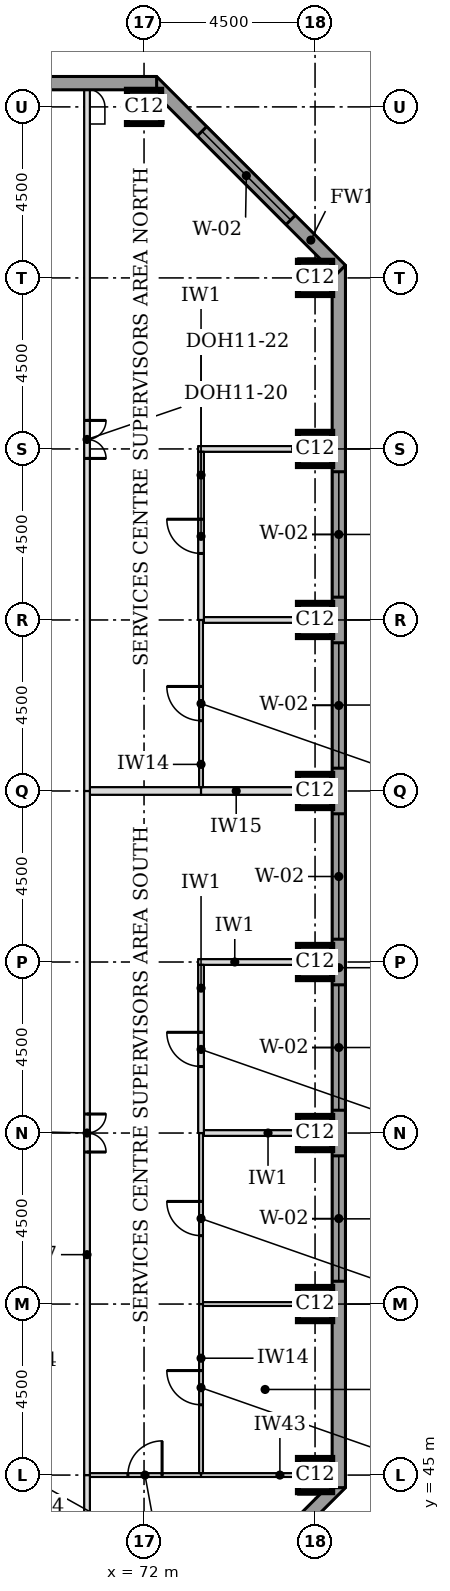
"""IFC4 building model, lengths in metres.
Left out: names, types, materials, properties, quantities, classifications, styles, units other than length and angle.
Written with IfcOpenShell. Run it as: python <this file> out.ifc"""

import sys

from ifc_helpers import new_model, si_unit, direction, frame, frame_2d, origin, origin_2d, place, context, subcontext, project, spatial, rectangle, extrude, element, fill, save


model = new_model("IFC4")
c1 = context("Model", 3, precision=1e-05, world=origin(), true_north=direction((0.0, 1.0)))
c2 = subcontext(c1, "Body", "Model", "MODEL_VIEW")
j1 = project(units=[si_unit("LENGTHUNIT", "METRE"), si_unit("PLANEANGLEUNIT", "RADIAN")], contexts=[c1])
p1 = place(None, origin())
s1 = spatial("IfcSite", under=j1, at=p1, CompositionType="ELEMENT")
p2 = place(p1, origin())
s2 = spatial("IfcBuilding", under=s1, at=p2, CompositionType="ELEMENT")
p3 = place(p2, frame((0.0, 0.0, 237.8)))
s3 = spatial("IfcBuildingStorey", under=s2, at=p3, CompositionType="ELEMENT", Elevation=237.8)
for number, where, z_axis, x_axis in (
    (1, (76.5, 45.0, 0.0), (0.0, 0.0, 1.0), (1.0, 0.0, 0.0)),
    (2, (76.5, 49.5, 0.0), (0.0, 0.0, 1.0), (1.0, 0.0, 0.0)),
    (3, (76.5, 54.0, 0.0), (0.0, 0.0, 1.0), (1.0, 0.0, 0.0)),
    (4, (76.5, 58.5, 0.0), (0.0, 0.0, 1.0), (1.0, 0.0, 0.0)),
    (5, (76.5, 63.0, 0.0), (0.0, 0.0, 1.0), (1.0, 0.0, 0.0)),
    (6, (76.5, 67.5, 0.0), (0.0, 0.0, 1.0), (1.0, 0.0, 0.0)),
    (7, (76.5, 72.0, 0.0), (0.0, 0.0, 1.0), (1.0, 0.0, 0.0)),
    (8, (76.5, 76.5, 0.0), (0.0, 0.0, 1.0), (1.0, 0.0, 0.0)),
    (9, (72.0, 81.0, 0.0), (0.0, 0.0, 1.0), (1.0, 0.0, 0.0)),
):
    element("IfcColumn", number, at=place(p3, frame(where, z_axis=z_axis, x_axis=x_axis)), inside=s3, PredefinedType="COLUMN", context=c2, shape_type="SweptSolid", body=[
        extrude(rectangle(XDim=0.9, YDim=0.9, at=origin_2d()), origin(), (0.0, 0.0, 1.0), 3.7),
    ])
p4 = place(p3, frame((72.208, 39.824, 0.0), z_axis=(0.0, 0.0, 1.0), x_axis=(0.707106781187, 0.707106781187, 0.0)))
e10 = element("IfcWall", 10, at=p4, inside=s3, PredefinedType="STANDARD", context=c2, shape_type="SweptSolid", body=[
    extrude(rectangle(XDim=7.027, YDim=0.35, at=frame_2d((3.513, 0.0))), origin(), (0.0, 0.0, 1.0), 3.525),
])
p5 = place(p4, frame((1.863, 0.0, 0.9)))
e11 = element("IfcOpeningElement", 11, at=p5, cuts=e10, PredefinedType="OPENING", context=c2, shape_type="SweptSolid", body=[
    extrude(rectangle(XDim=3.3, YDim=1.9, at=frame_2d((1.65, 0.95))), frame((0.0, 0.185, 0.0), z_axis=(0.0, -1.0, 0.0), x_axis=(1.0, 0.0, 0.0)), (0.0, 0.0, 1.0), 0.37),
])
p6 = place(p3, frame((77.125, 44.669, 0.0), z_axis=(0.0, 0.0, 1.0), x_axis=(0.0, 1.0, 0.0)))
e12 = element("IfcWall", 12, at=p6, inside=s3, PredefinedType="STANDARD", context=c2, shape_type="SweptSolid", body=[
    extrude(rectangle(XDim=32.163, YDim=0.35, at=frame_2d((16.081, 0.0))), origin(), (0.0, 0.0, 1.0), 3.525),
])
p7 = place(p6, frame((5.431, 0.0, 0.9)))
e13 = element("IfcOpeningElement", 13, at=p7, cuts=e12, PredefinedType="OPENING", context=c2, shape_type="SweptSolid", body=[
    extrude(rectangle(XDim=3.3, YDim=1.9, at=frame_2d((1.65, 0.95))), frame((0.0, 0.185, 0.0), z_axis=(0.0, -1.0, 0.0), x_axis=(1.0, 0.0, 0.0)), (0.0, 0.0, 1.0), 0.37),
])
p8 = place(p6, frame((9.931, 0.0, 0.9)))
e14 = element("IfcOpeningElement", 14, at=p8, cuts=e12, PredefinedType="OPENING", context=c2, shape_type="SweptSolid", body=[
    extrude(rectangle(XDim=3.3, YDim=1.9, at=frame_2d((1.65, 0.95))), frame((0.0, 0.185, 0.0), z_axis=(0.0, -1.0, 0.0), x_axis=(1.0, 0.0, 0.0)), (0.0, 0.0, 1.0), 0.37),
])
p9 = place(p6, frame((14.431, 0.0, 0.9)))
e15 = element("IfcOpeningElement", 15, at=p9, cuts=e12, PredefinedType="OPENING", context=c2, shape_type="SweptSolid", body=[
    extrude(rectangle(XDim=3.3, YDim=1.9, at=frame_2d((1.65, 0.95))), frame((0.0, 0.185, 0.0), z_axis=(0.0, -1.0, 0.0), x_axis=(1.0, 0.0, 0.0)), (0.0, 0.0, 1.0), 0.37),
])
p10 = place(p6, frame((18.931, 0.0, 0.9)))
e16 = element("IfcOpeningElement", 16, at=p10, cuts=e12, PredefinedType="OPENING", context=c2, shape_type="SweptSolid", body=[
    extrude(rectangle(XDim=3.3, YDim=1.9, at=frame_2d((1.65, 0.95))), frame((0.0, 0.185, 0.0), z_axis=(0.0, -1.0, 0.0), x_axis=(1.0, 0.0, 0.0)), (0.0, 0.0, 1.0), 0.37),
])
p11 = place(p6, frame((23.431, 0.0, 0.9)))
e17 = element("IfcOpeningElement", 17, at=p11, cuts=e12, PredefinedType="OPENING", context=c2, shape_type="SweptSolid", body=[
    extrude(rectangle(XDim=3.3, YDim=1.9, at=frame_2d((1.65, 0.95))), frame((0.0, 0.185, 0.0), z_axis=(0.0, -1.0, 0.0), x_axis=(1.0, 0.0, 0.0)), (0.0, 0.0, 1.0), 0.37),
])
p12 = place(p3, frame((77.176, 76.708, 0.0), z_axis=(0.0, 0.0, 1.0), x_axis=(-0.707106781187, 0.707106781187, 0.0)))
e18 = element("IfcWall", 18, at=p12, inside=s3, PredefinedType="STANDARD", context=c2, shape_type="SweptSolid", body=[
    extrude(rectangle(XDim=7.027, YDim=0.35, at=frame_2d((3.513, 0.0))), origin(), (0.0, 0.0, 1.0), 3.525),
])
p13 = place(p12, frame((1.863, 0.0, 0.9)))
e19 = element("IfcOpeningElement", 19, at=p13, cuts=e18, PredefinedType="OPENING", context=c2, shape_type="SweptSolid", body=[
    extrude(rectangle(XDim=3.3, YDim=1.9, at=frame_2d((1.65, 0.95))), frame((0.0, 0.185, 0.0), z_axis=(0.0, -1.0, 0.0), x_axis=(1.0, 0.0, 0.0)), (0.0, 0.0, 1.0), 0.37),
])
p14 = place(p3, frame((72.331, 81.625, 0.0), z_axis=(0.0, 0.0, 1.0), x_axis=(-1.0, 0.0, 0.0)))
e20 = element("IfcWall", 20, at=p14, inside=s3, PredefinedType="STANDARD", context=c2, shape_type="SweptSolid", body=[
    extrude(rectangle(XDim=32.163, YDim=0.35, at=frame_2d((16.081, 0.0))), origin(), (0.0, 0.0, 1.0), 3.525),
])
p15 = place(p14, frame((5.431, 0.0, 0.9)))
e21 = element("IfcOpeningElement", 21, at=p15, cuts=e20, PredefinedType="OPENING", context=c2, shape_type="SweptSolid", body=[
    extrude(rectangle(XDim=3.3, YDim=1.9, at=frame_2d((1.65, 0.95))), frame((0.0, 0.185, 0.0), z_axis=(0.0, -1.0, 0.0), x_axis=(1.0, 0.0, 0.0)), (0.0, 0.0, 1.0), 0.37),
])
p16 = place(p14, frame((9.931, 0.0, 0.9)))
e22 = element("IfcOpeningElement", 22, at=p16, cuts=e20, PredefinedType="OPENING", context=c2, shape_type="SweptSolid", body=[
    extrude(rectangle(XDim=3.3, YDim=1.9, at=frame_2d((1.65, 0.95))), frame((0.0, 0.185, 0.0), z_axis=(0.0, -1.0, 0.0), x_axis=(1.0, 0.0, 0.0)), (0.0, 0.0, 1.0), 0.37),
])
p17 = place(p14, frame((14.431, 0.0, 0.9)))
e23 = element("IfcOpeningElement", 23, at=p17, cuts=e20, PredefinedType="OPENING", context=c2, shape_type="SweptSolid", body=[
    extrude(rectangle(XDim=3.3, YDim=1.9, at=frame_2d((1.65, 0.95))), frame((0.0, 0.185, 0.0), z_axis=(0.0, -1.0, 0.0), x_axis=(1.0, 0.0, 0.0)), (0.0, 0.0, 1.0), 0.37),
])
p18 = place(p14, frame((18.931, 0.0, 0.9)))
e24 = element("IfcOpeningElement", 24, at=p18, cuts=e20, PredefinedType="OPENING", context=c2, shape_type="SweptSolid", body=[
    extrude(rectangle(XDim=3.3, YDim=1.9, at=frame_2d((1.65, 0.95))), frame((0.0, 0.185, 0.0), z_axis=(0.0, -1.0, 0.0), x_axis=(1.0, 0.0, 0.0)), (0.0, 0.0, 1.0), 0.37),
])
p19 = place(p14, frame((23.431, 0.0, 0.9)))
e25 = element("IfcOpeningElement", 25, at=p19, cuts=e20, PredefinedType="OPENING", context=c2, shape_type="SweptSolid", body=[
    extrude(rectangle(XDim=3.3, YDim=1.9, at=frame_2d((1.65, 0.95))), frame((0.0, 0.185, 0.0), z_axis=(0.0, -1.0, 0.0), x_axis=(1.0, 0.0, 0.0)), (0.0, 0.0, 1.0), 0.37),
])
p20 = place(p3, frame((70.575, 45.0, 0.0), z_axis=(0.0, 0.0, 1.0), x_axis=(1.0, 0.0, 0.0)))
e26 = element("IfcWall", 26, at=p20, inside=s3, PredefinedType="PARTITIONING", context=c2, shape_type="SweptSolid", body=[
    extrude(rectangle(XDim=2.925, YDim=0.1, at=frame_2d((1.462, 0.0))), origin(), (0.0, 0.0, 1.0), 3.096),
])
p21 = place(p20, frame((1.0, 0.0, 0.0)))
e27 = element("IfcOpeningElement", 27, at=p21, cuts=e26, PredefinedType="OPENING", context=c2, shape_type="SweptSolid", body=[
    extrude(rectangle(XDim=0.9, YDim=2.1, at=frame_2d((0.45, 1.05))), frame((0.0, 0.06, 0.0), z_axis=(0.0, -1.0, 0.0), x_axis=(1.0, 0.0, 0.0)), (0.0, 0.0, 1.0), 0.12),
])
p22 = place(p3, frame((73.5, 45.0, 0.0), z_axis=(0.0, 0.0, 1.0), x_axis=(1.0, 0.0, 0.0)))
e28 = element("IfcWall", 28, at=p22, inside=s3, PredefinedType="PARTITIONING", context=c2, shape_type="SweptSolid", body=[
    extrude(rectangle(XDim=2.55, YDim=0.1, at=frame_2d((1.275, 0.0))), origin(), (0.0, 0.0, 1.0), 3.096),
])
p23 = place(p3, frame((73.55, 49.5, 0.0), z_axis=(0.0, 0.0, 1.0), x_axis=(1.0, 0.0, 0.0)))
e29 = element("IfcWall", 29, at=p23, inside=s3, PredefinedType="PARTITIONING", context=c2, shape_type="SweptSolid", body=[
    extrude(rectangle(XDim=3.4, YDim=0.1, at=frame_2d((1.7, 0.0))), origin(), (0.0, 0.0, 1.0), 3.55),
])
p24 = place(p3, frame((73.575, 54.0, 0.0), z_axis=(0.0, 0.0, 1.0), x_axis=(1.0, 0.0, 0.0)))
e30 = element("IfcWall", 30, at=p24, inside=s3, PredefinedType="PARTITIONING", context=c2, shape_type="SweptSolid", body=[
    extrude(rectangle(XDim=3.375, YDim=0.15, at=frame_2d((1.688, 0.0))), origin(), (0.0, 0.0, 1.0), 3.55),
])
p25 = place(p3, frame((73.425, 58.5, 0.0), z_axis=(0.0, 0.0, 1.0), x_axis=(1.0, 0.0, 0.0)))
e31 = element("IfcWall", 31, at=p25, inside=s3, PredefinedType="PARTITIONING", context=c2, shape_type="SweptSolid", body=[
    extrude(rectangle(XDim=3.525, YDim=0.15, at=frame_2d((1.762, 0.0))), origin(), (0.0, 0.0, 1.0), 3.55),
])
p26 = place(p3, frame((70.575, 63.0, 0.0), z_axis=(0.0, 0.0, 1.0), x_axis=(1.0, 0.0, 0.0)))
e32 = element("IfcWall", 32, at=p26, inside=s3, PredefinedType="PARTITIONING", context=c2, shape_type="SweptSolid", body=[
    extrude(rectangle(XDim=2.925, YDim=0.2, at=frame_2d((1.462, 0.0))), origin(), (0.0, 0.0, 1.0), 3.55),
])
p27 = place(p3, frame((73.5, 63.0, 0.0), z_axis=(0.0, 0.0, 1.0), x_axis=(1.0, 0.0, 0.0)))
e33 = element("IfcWall", 33, at=p27, inside=s3, PredefinedType="PARTITIONING", context=c2, shape_type="SweptSolid", body=[
    extrude(rectangle(XDim=3.45, YDim=0.2, at=frame_2d((1.725, 0.0))), origin(), (0.0, 0.0, 1.0), 3.55),
])
p28 = place(p3, frame((73.575, 67.5, 0.0), z_axis=(0.0, 0.0, 1.0), x_axis=(1.0, 0.0, 0.0)))
e34 = element("IfcWall", 34, at=p28, inside=s3, PredefinedType="PARTITIONING", context=c2, shape_type="SweptSolid", body=[
    extrude(rectangle(XDim=3.375, YDim=0.15, at=frame_2d((1.688, 0.0))), origin(), (0.0, 0.0, 1.0), 3.55),
])
p29 = place(p3, frame((73.425, 72.0, 0.0), z_axis=(0.0, 0.0, 1.0), x_axis=(1.0, 0.0, 0.0)))
e35 = element("IfcWall", 35, at=p29, inside=s3, PredefinedType="PARTITIONING", context=c2, shape_type="SweptSolid", body=[
    extrude(rectangle(XDim=3.525, YDim=0.15, at=frame_2d((1.762, 0.0))), origin(), (0.0, 0.0, 1.0), 3.55),
])
p30 = place(p3, frame((70.5, 40.05, 0.0), z_axis=(0.0, 0.0, 1.0), x_axis=(0.0, 1.0, 0.0)))
e36 = element("IfcWall", 36, at=p30, inside=s3, PredefinedType="PARTITIONING", context=c2, shape_type="SweptSolid", body=[
    extrude(rectangle(XDim=4.95, YDim=0.15, at=frame_2d((2.475, 0.0))), origin(), (0.0, 0.0, 1.0), 3.55),
])
p31 = place(p3, frame((70.5, 45.0, 0.0), z_axis=(0.0, 0.0, 1.0), x_axis=(0.0, 1.0, 0.0)))
e37 = element("IfcWall", 37, at=p31, inside=s3, PredefinedType="PARTITIONING", context=c2, shape_type="SweptSolid", body=[
    extrude(rectangle(XDim=18.0, YDim=0.15, at=frame_2d((9.0, 0.0))), origin(), (0.0, 0.0, 1.0), 3.55),
])
p32 = place(p31, frame((8.5, 0.0, 0.0)))
e38 = element("IfcOpeningElement", 38, at=p32, cuts=e37, PredefinedType="OPENING", context=c2, shape_type="SweptSolid", body=[
    extrude(rectangle(XDim=1.0, YDim=2.1, at=frame_2d((0.5, 1.05))), frame((0.0, 0.085, 0.0), z_axis=(0.0, -1.0, 0.0), x_axis=(1.0, 0.0, 0.0)), (0.0, 0.0, 1.0), 0.17),
])
p33 = place(p3, frame((73.5, 45.05, 0.0), z_axis=(0.0, 0.0, 1.0), x_axis=(0.0, 1.0, 0.0)))
e39 = element("IfcWall", 39, at=p33, inside=s3, PredefinedType="PARTITIONING", context=c2, shape_type="SweptSolid", body=[
    extrude(rectangle(XDim=4.45, YDim=0.1, at=frame_2d((2.225, 0.0))), origin(), (0.0, 0.0, 1.0), 3.55),
])
p34 = place(p33, frame((1.8, 0.0, 0.0)))
e40 = element("IfcOpeningElement", 40, at=p34, cuts=e39, PredefinedType="OPENING", context=c2, shape_type="SweptSolid", body=[
    extrude(rectangle(XDim=0.9, YDim=2.1, at=frame_2d((0.45, 1.05))), frame((0.0, 0.06, 0.0), z_axis=(0.0, -1.0, 0.0), x_axis=(1.0, 0.0, 0.0)), (0.0, 0.0, 1.0), 0.12),
])
p35 = place(p3, frame((73.5, 49.5, 0.0), z_axis=(0.0, 0.0, 1.0), x_axis=(0.0, 1.0, 0.0)))
e41 = element("IfcWall", 41, at=p35, inside=s3, PredefinedType="PARTITIONING", context=c2, shape_type="SweptSolid", body=[
    extrude(rectangle(XDim=4.5, YDim=0.1, at=frame_2d((2.25, 0.0))), origin(), (0.0, 0.0, 1.0), 3.55),
])
p36 = place(p35, frame((1.8, 0.0, 0.0)))
e42 = element("IfcOpeningElement", 42, at=p36, cuts=e41, PredefinedType="OPENING", context=c2, shape_type="SweptSolid", body=[
    extrude(rectangle(XDim=0.9, YDim=2.1, at=frame_2d((0.45, 1.05))), frame((0.0, 0.06, 0.0), z_axis=(0.0, -1.0, 0.0), x_axis=(1.0, 0.0, 0.0)), (0.0, 0.0, 1.0), 0.12),
])
p37 = place(p3, frame((73.5, 54.0, 0.0), z_axis=(0.0, 0.0, 1.0), x_axis=(0.0, 1.0, 0.0)))
e43 = element("IfcWall", 43, at=p37, inside=s3, PredefinedType="PARTITIONING", context=c2, shape_type="SweptSolid", body=[
    extrude(rectangle(XDim=4.425, YDim=0.15, at=frame_2d((2.212, 0.0))), origin(), (0.0, 0.0, 1.0), 3.55),
])
p38 = place(p37, frame((1.75, 0.0, 0.0)))
e44 = element("IfcOpeningElement", 44, at=p38, cuts=e43, PredefinedType="OPENING", context=c2, shape_type="SweptSolid", body=[
    extrude(rectangle(XDim=0.9, YDim=2.1, at=frame_2d((0.45, 1.05))), frame((0.0, 0.085, 0.0), z_axis=(0.0, -1.0, 0.0), x_axis=(1.0, 0.0, 0.0)), (0.0, 0.0, 1.0), 0.17),
])
p39 = place(p3, frame((70.5, 63.0, 0.0), z_axis=(0.0, 0.0, 1.0), x_axis=(0.0, 1.0, 0.0)))
e45 = element("IfcWall", 45, at=p39, inside=s3, PredefinedType="PARTITIONING", context=c2, shape_type="SweptSolid", body=[
    extrude(rectangle(XDim=18.45, YDim=0.15, at=frame_2d((9.225, 0.0))), origin(), (0.0, 0.0, 1.0), 3.55),
])
p40 = place(p39, frame((8.75, 0.0, 0.0)))
e46 = element("IfcOpeningElement", 46, at=p40, cuts=e45, PredefinedType="OPENING", context=c2, shape_type="SweptSolid", body=[
    extrude(rectangle(XDim=1.0, YDim=2.1, at=frame_2d((0.5, 1.05))), frame((0.0, 0.085, 0.0), z_axis=(0.0, -1.0, 0.0), x_axis=(1.0, 0.0, 0.0)), (0.0, 0.0, 1.0), 0.17),
])
p41 = place(p3, frame((73.5, 63.1, 0.0), z_axis=(0.0, 0.0, 1.0), x_axis=(0.0, 1.0, 0.0)))
e47 = element("IfcWall", 47, at=p41, inside=s3, PredefinedType="PARTITIONING", context=c2, shape_type="SweptSolid", body=[
    extrude(rectangle(XDim=4.4, YDim=0.1, at=frame_2d((2.2, 0.0))), origin(), (0.0, 0.0, 1.0), 3.55),
])
p42 = place(p41, frame((1.75, 0.0, 0.0)))
e48 = element("IfcOpeningElement", 48, at=p42, cuts=e47, PredefinedType="OPENING", context=c2, shape_type="SweptSolid", body=[
    extrude(rectangle(XDim=0.9, YDim=2.1, at=frame_2d((0.45, 1.05))), frame((0.0, 0.06, 0.0), z_axis=(0.0, -1.0, 0.0), x_axis=(1.0, 0.0, 0.0)), (0.0, 0.0, 1.0), 0.12),
])
p43 = place(p3, frame((73.5, 67.5, 0.0), z_axis=(0.0, 0.0, 1.0), x_axis=(0.0, 1.0, 0.0)))
e49 = element("IfcWall", 49, at=p43, inside=s3, PredefinedType="PARTITIONING", context=c2, shape_type="SweptSolid", body=[
    extrude(rectangle(XDim=4.425, YDim=0.15, at=frame_2d((2.212, 0.0))), origin(), (0.0, 0.0, 1.0), 3.55),
])
p44 = place(p43, frame((1.75, 0.0, 0.0)))
e50 = element("IfcOpeningElement", 50, at=p44, cuts=e49, PredefinedType="OPENING", context=c2, shape_type="SweptSolid", body=[
    extrude(rectangle(XDim=0.9, YDim=2.1, at=frame_2d((0.45, 1.05))), frame((0.0, 0.085, 0.0), z_axis=(0.0, -1.0, 0.0), x_axis=(1.0, 0.0, 0.0)), (0.0, 0.0, 1.0), 0.17),
])
p45 = place(p7, origin())
e51 = element("IfcWindow", 51, at=p45, inside=s3, PartitioningType="SINGLE_PANEL", PredefinedType="WINDOW", context=c2, shape_type="SweptSolid", body=[
    extrude(rectangle(XDim=3.3, YDim=1.9, at=frame_2d((1.65, 0.95))), frame((0.0, 0.085, 0.0), z_axis=(0.0, -1.0, 0.0), x_axis=(1.0, 0.0, 0.0)), (0.0, 0.0, 1.0), 0.06),
])
fill(e13, e51)
p46 = place(p8, origin())
e52 = element("IfcWindow", 52, at=p46, inside=s3, PartitioningType="SINGLE_PANEL", PredefinedType="WINDOW", context=c2, shape_type="SweptSolid", body=[
    extrude(rectangle(XDim=3.3, YDim=1.9, at=frame_2d((1.65, 0.95))), frame((0.0, 0.085, 0.0), z_axis=(0.0, -1.0, 0.0), x_axis=(1.0, 0.0, 0.0)), (0.0, 0.0, 1.0), 0.06),
])
fill(e14, e52)
p47 = place(p9, origin())
e53 = element("IfcWindow", 53, at=p47, inside=s3, PartitioningType="SINGLE_PANEL", PredefinedType="WINDOW", context=c2, shape_type="SweptSolid", body=[
    extrude(rectangle(XDim=3.3, YDim=1.9, at=frame_2d((1.65, 0.95))), frame((0.0, 0.085, 0.0), z_axis=(0.0, -1.0, 0.0), x_axis=(1.0, 0.0, 0.0)), (0.0, 0.0, 1.0), 0.06),
])
fill(e15, e53)
p48 = place(p10, origin())
e54 = element("IfcWindow", 54, at=p48, inside=s3, PartitioningType="SINGLE_PANEL", PredefinedType="WINDOW", context=c2, shape_type="SweptSolid", body=[
    extrude(rectangle(XDim=3.3, YDim=1.9, at=frame_2d((1.65, 0.95))), frame((0.0, 0.085, 0.0), z_axis=(0.0, -1.0, 0.0), x_axis=(1.0, 0.0, 0.0)), (0.0, 0.0, 1.0), 0.06),
])
fill(e16, e54)
p49 = place(p11, origin())
e55 = element("IfcWindow", 55, at=p49, inside=s3, PartitioningType="SINGLE_PANEL", PredefinedType="WINDOW", context=c2, shape_type="SweptSolid", body=[
    extrude(rectangle(XDim=3.3, YDim=1.9, at=frame_2d((1.65, 0.95))), frame((0.0, 0.085, 0.0), z_axis=(0.0, -1.0, 0.0), x_axis=(1.0, 0.0, 0.0)), (0.0, 0.0, 1.0), 0.06),
])
fill(e17, e55)
p50 = place(p13, origin())
e56 = element("IfcWindow", 56, at=p50, inside=s3, PartitioningType="SINGLE_PANEL", PredefinedType="WINDOW", context=c2, shape_type="SweptSolid", body=[
    extrude(rectangle(XDim=3.3, YDim=1.9, at=frame_2d((1.65, 0.95))), frame((0.0, 0.085, 0.0), z_axis=(0.0, -1.0, 0.0), x_axis=(1.0, 0.0, 0.0)), (0.0, 0.0, 1.0), 0.06),
])
fill(e19, e56)
p51 = place(p32, frame((1.0, 0.0, 0.0), z_axis=(0.0, 0.0, 1.0), x_axis=(-1.0, 0.0, 0.0)))
e57 = element("IfcDoor", 57, at=p51, inside=s3, OperationType="DOUBLE_DOOR_SINGLE_SWING", PredefinedType="DOOR", context=c2, shape_type="SweptSolid", body=[
    extrude(rectangle(XDim=1.0, YDim=2.1, at=frame_2d((0.5, 1.05))), frame((0.0, 0.025, 0.0), z_axis=(0.0, -1.0, 0.0), x_axis=(1.0, 0.0, 0.0)), (0.0, 0.0, 1.0), 0.05),
])
fill(e38, e57)
p52 = place(p21, origin())
e58 = element("IfcDoor", 58, at=p52, inside=s3, OperationType="SINGLE_SWING_RIGHT", PredefinedType="DOOR", context=c2, shape_type="SweptSolid", body=[
    extrude(rectangle(XDim=0.9, YDim=2.1, at=frame_2d((0.45, 1.05))), frame((0.0, 0.025, 0.0), z_axis=(0.0, -1.0, 0.0), x_axis=(1.0, 0.0, 0.0)), (0.0, 0.0, 1.0), 0.05),
])
fill(e27, e58)
p53 = place(p34, origin())
e59 = element("IfcDoor", 59, at=p53, inside=s3, OperationType="SINGLE_SWING_RIGHT", PredefinedType="DOOR", context=c2, shape_type="SweptSolid", body=[
    extrude(rectangle(XDim=0.9, YDim=2.1, at=frame_2d((0.45, 1.05))), frame((0.0, 0.025, 0.0), z_axis=(0.0, -1.0, 0.0), x_axis=(1.0, 0.0, 0.0)), (0.0, 0.0, 1.0), 0.05),
])
fill(e40, e59)
p54 = place(p36, origin())
e60 = element("IfcDoor", 60, at=p54, inside=s3, OperationType="SINGLE_SWING_RIGHT", PredefinedType="DOOR", context=c2, shape_type="SweptSolid", body=[
    extrude(rectangle(XDim=0.9, YDim=2.1, at=frame_2d((0.45, 1.05))), frame((0.0, 0.025, 0.0), z_axis=(0.0, -1.0, 0.0), x_axis=(1.0, 0.0, 0.0)), (0.0, 0.0, 1.0), 0.05),
])
fill(e42, e60)
p55 = place(p38, origin())
e61 = element("IfcDoor", 61, at=p55, inside=s3, OperationType="SINGLE_SWING_RIGHT", PredefinedType="DOOR", context=c2, shape_type="SweptSolid", body=[
    extrude(rectangle(XDim=0.9, YDim=2.1, at=frame_2d((0.45, 1.05))), frame((0.0, 0.025, 0.0), z_axis=(0.0, -1.0, 0.0), x_axis=(1.0, 0.0, 0.0)), (0.0, 0.0, 1.0), 0.05),
])
fill(e44, e61)
p56 = place(p40, frame((1.0, 0.0, 0.0), z_axis=(0.0, 0.0, 1.0), x_axis=(-1.0, 0.0, 0.0)))
e62 = element("IfcDoor", 62, at=p56, inside=s3, OperationType="DOUBLE_DOOR_SINGLE_SWING", PredefinedType="DOOR", context=c2, shape_type="SweptSolid", body=[
    extrude(rectangle(XDim=1.0, YDim=2.1, at=frame_2d((0.5, 1.05))), frame((0.0, 0.025, 0.0), z_axis=(0.0, -1.0, 0.0), x_axis=(1.0, 0.0, 0.0)), (0.0, 0.0, 1.0), 0.05),
])
fill(e46, e62)
p57 = place(p42, origin())
e63 = element("IfcDoor", 63, at=p57, inside=s3, OperationType="SINGLE_SWING_RIGHT", PredefinedType="DOOR", context=c2, shape_type="SweptSolid", body=[
    extrude(rectangle(XDim=0.9, YDim=2.1, at=frame_2d((0.45, 1.05))), frame((0.0, 0.025, 0.0), z_axis=(0.0, -1.0, 0.0), x_axis=(1.0, 0.0, 0.0)), (0.0, 0.0, 1.0), 0.05),
])
fill(e48, e63)
p58 = place(p44, origin())
e64 = element("IfcDoor", 64, at=p58, inside=s3, OperationType="SINGLE_SWING_RIGHT", PredefinedType="DOOR", context=c2, shape_type="SweptSolid", body=[
    extrude(rectangle(XDim=0.9, YDim=2.1, at=frame_2d((0.45, 1.05))), frame((0.0, 0.025, 0.0), z_axis=(0.0, -1.0, 0.0), x_axis=(1.0, 0.0, 0.0)), (0.0, 0.0, 1.0), 0.05),
])
fill(e50, e64)
save(model, sys.argv[1])
